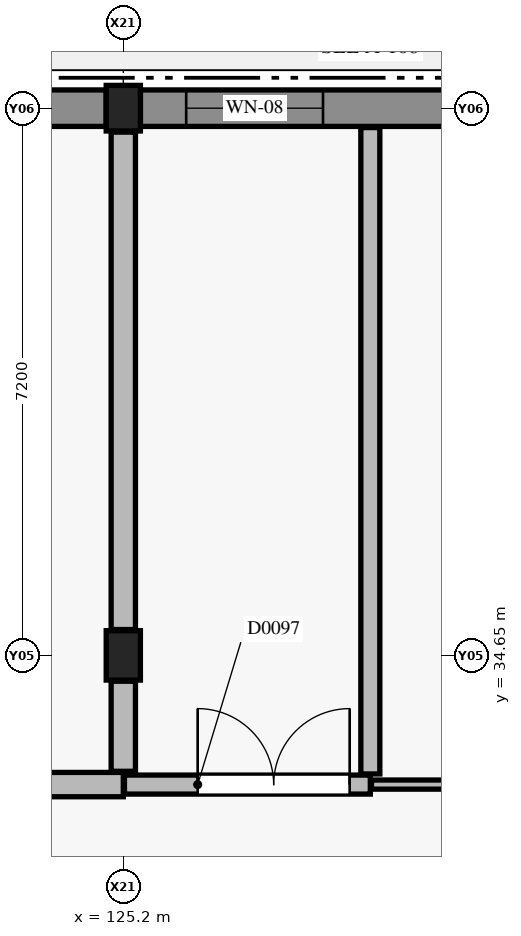
"""IFC4 building model, lengths in metres.
Left out: names, types, materials, properties, quantities, classifications, styles, units other than length and angle.
Written with IfcOpenShell. Run it as: python <this file> out.ifc"""

import sys

from ifc_helpers import new_model, si_unit, direction, frame, frame_2d, origin, origin_2d, place, context, subcontext, project, spatial, rectangle, extrude, element, fill, save


model = new_model("IFC4")
c1 = context("Model", 3, precision=1e-05, world=origin(), true_north=direction((0.0, 1.0)))
c2 = subcontext(c1, "Body", "Model", "MODEL_VIEW")
j1 = project(units=[si_unit("LENGTHUNIT", "METRE"), si_unit("PLANEANGLEUNIT", "RADIAN")], contexts=[c1])
p1 = place(None, origin())
s1 = spatial("IfcSite", under=j1, at=p1, CompositionType="ELEMENT")
p2 = place(p1, origin())
s2 = spatial("IfcBuilding", under=s1, at=p2, CompositionType="ELEMENT")
p3 = place(p2, origin())
s3 = spatial("IfcBuildingStorey", under=s2, at=p3, CompositionType="ELEMENT", Elevation=0.0)
p4 = place(p3, frame((125.2, 34.65, 0.0), z_axis=(0.0, 0.0, 1.0), x_axis=(1.0, 0.0, 0.0)))
e1 = element("IfcColumn", 1, at=p4, inside=s3, PredefinedType="COLUMN", context=c2, shape_type="SweptSolid", body=[
    extrude(rectangle(XDim=0.45, YDim=0.65, at=origin_2d()), origin(), (0.0, 0.0, 1.0), 4.8),
])
p5 = place(p3, frame((125.2, 41.85, 0.0), z_axis=(0.0, 0.0, 1.0), x_axis=(1.0, 0.0, 0.0)))
e2 = element("IfcColumn", 2, at=p5, inside=s3, PredefinedType="COLUMN", context=c2, shape_type="SweptSolid", body=[
    extrude(rectangle(XDim=0.45, YDim=0.6, at=origin_2d()), origin(), (0.0, 0.0, 1.0), 4.8),
])
p6 = place(p3, frame((118.3, 41.85, 0.0), z_axis=(0.0, 0.0, 1.0), x_axis=(1.0, 0.0, 0.0)))
e3 = element("IfcWall", 3, at=p6, inside=s3, PredefinedType="SOLIDWALL", context=c2, shape_type="SweptSolid", body=[
    extrude(rectangle(XDim=6.675, YDim=0.48, at=frame_2d((3.337, 0.0))), origin(), (0.0, 0.0, 1.0), 3.64),
])
p7 = place(p6, frame((2.538, 0.0, 0.9)))
e4 = element("IfcOpeningElement", 4, at=p7, cuts=e3, PredefinedType="OPENING", context=c2, shape_type="SweptSolid", body=[
    extrude(rectangle(XDim=1.6, YDim=1.8, at=frame_2d((0.8, 0.9))), frame((0.0, 0.25, 0.0), z_axis=(0.0, -1.0, 0.0), x_axis=(1.0, 0.0, 0.0)), (0.0, 0.0, 1.0), 0.5),
])
p8 = place(p3, frame((125.425, 41.85, 0.0), z_axis=(0.0, 0.0, 1.0), x_axis=(1.0, 0.0, 0.0)))
e5 = element("IfcWall", 5, at=p8, inside=s3, PredefinedType="SOLIDWALL", context=c2, shape_type="SweptSolid", body=[
    extrude(rectangle(XDim=6.675, YDim=0.48, at=frame_2d((3.337, 0.0))), origin(), (0.0, 0.0, 1.0), 3.64),
])
p9 = place(p8, frame((0.603, 0.0, 0.9)))
e6 = element("IfcOpeningElement", 6, at=p9, cuts=e5, PredefinedType="OPENING", context=c2, shape_type="SweptSolid", body=[
    extrude(rectangle(XDim=1.8, YDim=1.8, at=frame_2d((0.9, 0.9))), frame((0.0, 0.25, 0.0), z_axis=(0.0, -1.0, 0.0), x_axis=(1.0, 0.0, 0.0)), (0.0, 0.0, 1.0), 0.5),
])
p10 = place(p8, frame((4.26, 0.0, 0.9)))
e7 = element("IfcOpeningElement", 7, at=p10, cuts=e5, PredefinedType="OPENING", context=c2, shape_type="SweptSolid", body=[
    extrude(rectangle(XDim=1.2, YDim=1.5, at=frame_2d((0.6, 0.75))), frame((0.0, 0.25, 0.0), z_axis=(0.0, -1.0, 0.0), x_axis=(1.0, 0.0, 0.0)), (0.0, 0.0, 1.0), 0.5),
])
p11 = place(p3, frame((121.6, 32.95, 0.0), z_axis=(0.0, 0.0, 1.0), x_axis=(1.0, 0.0, 0.0)))
e8 = element("IfcWall", 8, at=p11, inside=s3, PredefinedType="PARTITIONING", context=c2, shape_type="SweptSolid", body=[
    extrude(rectangle(XDim=3.6, YDim=0.32, at=frame_2d((1.8, 0.0))), origin(), (0.0, 0.0, 1.0), 3.925),
])
p12 = place(p11, frame((1.075, 0.0, 0.0)))
e9 = element("IfcOpeningElement", 9, at=p12, cuts=e8, PredefinedType="OPENING", context=c2, shape_type="SweptSolid", body=[
    extrude(rectangle(XDim=1.45, YDim=2.25, at=frame_2d((0.725, 1.125))), frame((0.0, 0.17, 0.0), z_axis=(0.0, -1.0, 0.0), x_axis=(1.0, 0.0, 0.0)), (0.0, 0.0, 1.0), 0.34),
])
p13 = place(p3, frame((125.215, 32.95, 0.0), z_axis=(0.0, 0.0, 1.0), x_axis=(1.0, 0.0, 0.0)))
e10 = element("IfcWall", 10, at=p13, inside=s3, PredefinedType="PARTITIONING", context=c2, shape_type="SweptSolid", body=[
    extrude(rectangle(XDim=3.235, YDim=0.25, at=frame_2d((1.617, 0.0))), origin(), (0.0, 0.0, 1.0), 3.925),
])
p14 = place(p13, frame((0.963, 0.0, 0.0)))
e11 = element("IfcOpeningElement", 11, at=p14, cuts=e10, PredefinedType="OPENING", context=c2, shape_type="SweptSolid", body=[
    extrude(rectangle(XDim=2.0, YDim=2.4, at=frame_2d((1.0, 1.2))), frame((0.0, 0.135, 0.0), z_axis=(0.0, -1.0, 0.0), x_axis=(1.0, 0.0, 0.0)), (0.0, 0.0, 1.0), 0.27),
])
p15 = place(p3, frame((128.465, 32.95, 0.0), z_axis=(0.0, 0.0, 1.0), x_axis=(1.0, 0.0, 0.0)))
e12 = element("IfcWall", 12, at=p15, inside=s3, PredefinedType="PARTITIONING", context=c2, shape_type="SweptSolid", body=[
    extrude(rectangle(XDim=3.92, YDim=0.12, at=frame_2d((1.96, 0.0))), origin(), (0.0, 0.0, 1.0), 3.725),
])
p16 = place(p15, frame((1.762, 0.0, 0.0)))
e13 = element("IfcOpeningElement", 13, at=p16, cuts=e12, PredefinedType="OPENING", context=c2, shape_type="SweptSolid", body=[
    extrude(rectangle(XDim=1.25, YDim=2.15, at=frame_2d((0.625, 1.075))), frame((0.0, 0.07, 0.0), z_axis=(0.0, -1.0, 0.0), x_axis=(1.0, 0.0, 0.0)), (0.0, 0.0, 1.0), 0.14),
])
p17 = place(p3, frame((125.2, 33.125, 0.0), z_axis=(0.0, 0.0, 1.0), x_axis=(0.0, 1.0, 0.0)))
e14 = element("IfcWall", 14, at=p17, inside=s3, PredefinedType="PARTITIONING", context=c2, shape_type="SweptSolid", body=[
    extrude(rectangle(XDim=1.185, YDim=0.32, at=frame_2d((0.593, 0.0))), origin(), (0.0, 0.0, 1.0), 3.925),
])
p18 = place(p3, frame((125.2, 34.99, 0.0), z_axis=(0.0, 0.0, 1.0), x_axis=(0.0, 1.0, 0.0)))
e15 = element("IfcWall", 15, at=p18, inside=s3, PredefinedType="PARTITIONING", context=c2, shape_type="SweptSolid", body=[
    extrude(rectangle(XDim=6.545, YDim=0.32, at=frame_2d((3.272, 0.0))), origin(), (0.0, 0.0, 1.0), 3.965),
])
p19 = place(p3, frame((128.45, 33.09, 0.0), z_axis=(0.0, 0.0, 1.0), x_axis=(0.0, 1.0, 0.0)))
e16 = element("IfcWall", 16, at=p19, inside=s3, PredefinedType="PARTITIONING", context=c2, shape_type="SweptSolid", body=[
    extrude(rectangle(XDim=8.505, YDim=0.25, at=frame_2d((4.252, 0.0))), origin(), (0.0, 0.0, 1.0), 3.725),
])
p20 = place(p9, origin())
e17 = element("IfcWindow", 17, at=p20, inside=s3, PartitioningType="SINGLE_PANEL", PredefinedType="WINDOW", context=c2, shape_type="SweptSolid", body=[
    extrude(rectangle(XDim=1.8, YDim=1.8, at=frame_2d((0.9, 0.9))), frame((0.0, 0.03, 0.0), z_axis=(0.0, -1.0, 0.0), x_axis=(1.0, 0.0, 0.0)), (0.0, 0.0, 1.0), 0.06),
])
fill(e6, e17)
p21 = place(p14, origin())
e18 = element("IfcDoor", 18, at=p21, inside=s3, OperationType="DOUBLE_DOOR_SINGLE_SWING", PredefinedType="DOOR", context=c2, shape_type="SweptSolid", body=[
    extrude(rectangle(XDim=2.0, YDim=2.4, at=frame_2d((1.0, 1.2))), frame((0.0, 0.025, 0.0), z_axis=(0.0, -1.0, 0.0), x_axis=(1.0, 0.0, 0.0)), (0.0, 0.0, 1.0), 0.05),
])
fill(e11, e18)
save(model, sys.argv[1])
